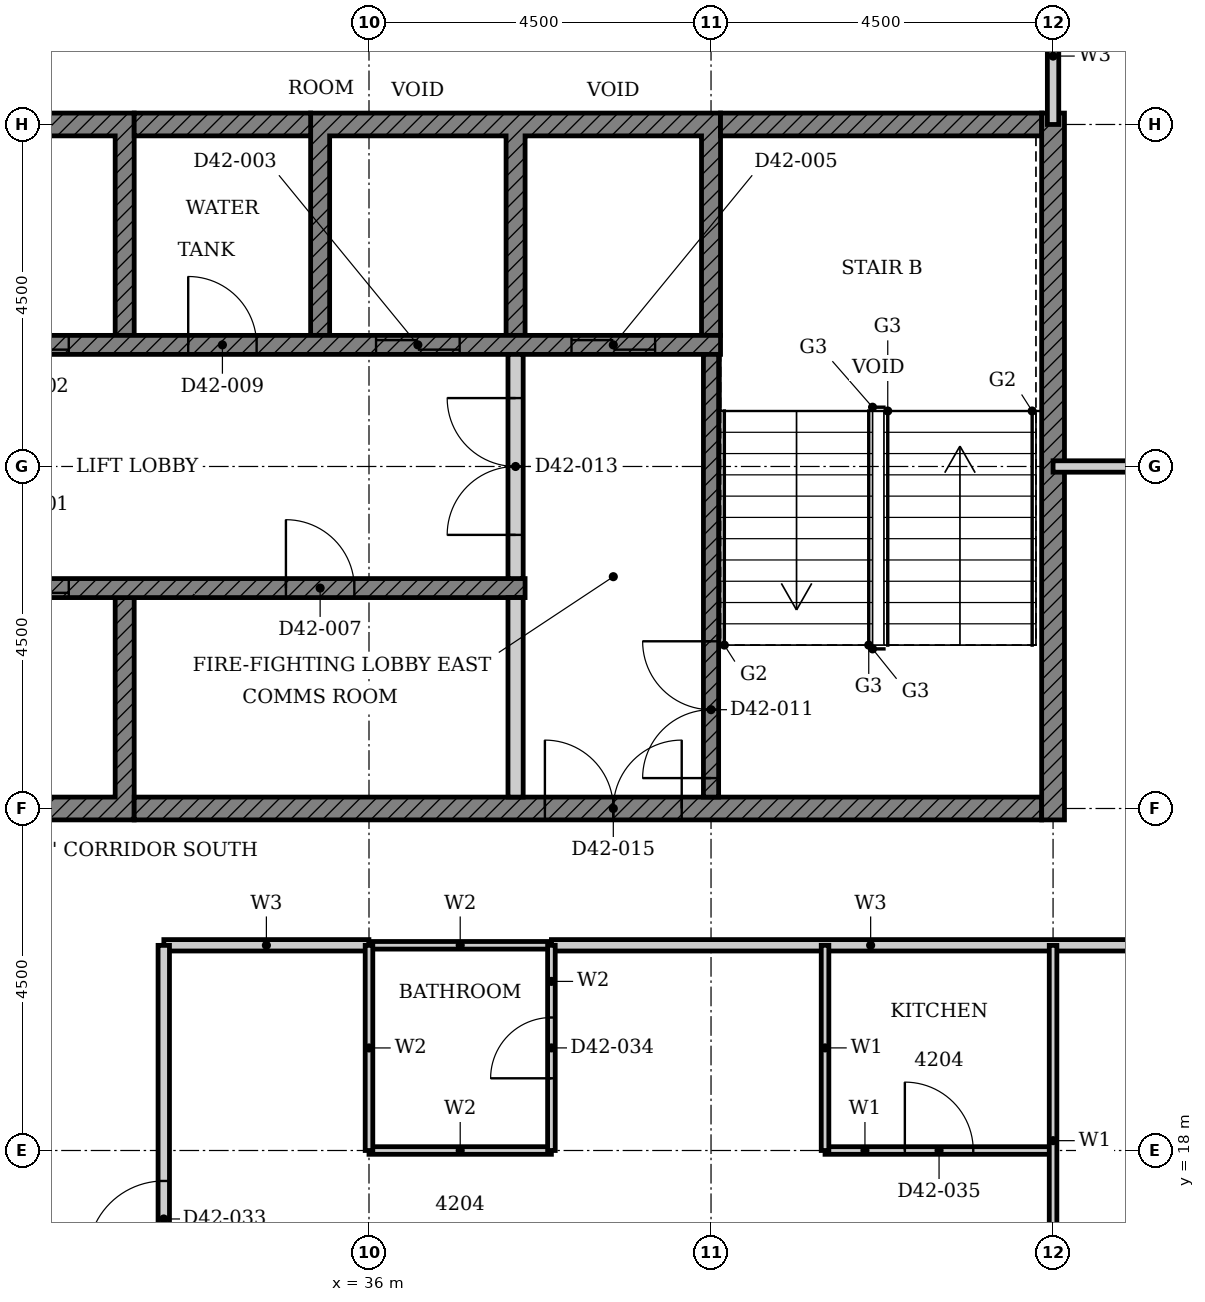
"""IFC4 building model, lengths in metres.
Left out: names, types, materials, properties, quantities, classifications, styles, units other than length and angle.
Written with IfcOpenShell. Run it as: python <this file> out.ifc"""

import sys

from ifc_helpers import new_model, si_unit, direction, frame, frame_2d, origin, place, context, subcontext, project, spatial, polyline, rectangle, outline, extrude, element, fill, save


model = new_model("IFC4")
c1 = context("Model", 3, precision=1e-05, world=origin(), true_north=direction((0.0, 1.0)))
c2 = subcontext(c1, "Body", "Model", "MODEL_VIEW")
j1 = project(units=[si_unit("LENGTHUNIT", "METRE"), si_unit("PLANEANGLEUNIT", "RADIAN")], contexts=[c1])
p1 = place(None, origin())
s1 = spatial("IfcSite", under=j1, at=p1, CompositionType="ELEMENT")
p2 = place(p1, origin())
s2 = spatial("IfcBuilding", under=s1, at=p2, CompositionType="ELEMENT")
p3 = place(p2, frame((0.0, 0.0, 169.1)))
s3 = spatial("IfcBuildingStorey", under=s2, at=p3, CompositionType="ELEMENT", Elevation=169.1)
p4 = place(p3, origin())
e1 = element("IfcWall", 1, at=p4, inside=s3, PredefinedType="SHEAR", context=c2, shape_type="SweptSolid", body=[
    extrude(outline(polyline([(27.518, 22.35), (32.911, 22.35), (32.911, 25.275), (32.661, 25.275), (32.661, 22.65), (30.339, 22.65), (30.339, 25.275), (30.089, 25.275), (30.089, 22.65), (27.768, 22.65), (27.768, 25.275), (27.518, 25.275), (27.518, 22.35)])), origin(), (0.0, 0.0, 1.0), 3.4),
])
p5 = place(p3, origin())
e2 = element("IfcWall", 2, at=p5, inside=s3, PredefinedType="SHEAR", context=c2, shape_type="SweptSolid", body=[
    extrude(outline(polyline([(27.518, 28.725), (27.768, 28.725), (27.768, 31.35), (30.089, 31.35), (30.089, 28.725), (30.339, 28.725), (30.339, 31.35), (32.661, 31.35), (32.661, 28.725), (32.911, 28.725), (32.911, 31.65), (27.518, 31.65), (27.518, 28.725)])), origin(), (0.0, 0.0, 1.0), 3.4),
])
p6 = place(p3, origin())
e3 = element("IfcWall", 3, at=p6, inside=s3, PredefinedType="SHEAR", context=c2, shape_type="SweptSolid", body=[
    extrude(outline(polyline([(35.232, 28.725), (35.482, 28.725), (35.482, 31.35), (37.803, 31.35), (37.803, 28.725), (38.053, 28.725), (38.053, 31.35), (40.375, 31.35), (40.375, 28.725), (40.625, 28.725), (40.625, 31.65), (35.232, 31.65), (35.232, 28.725)])), origin(), (0.0, 0.0, 1.0), 3.4),
])
p7 = place(p3, frame((32.911, 22.5, 0.0), z_axis=(0.0, 0.0, 1.0), x_axis=(1.0, 0.0, 0.0)))
e4 = element("IfcWall", 4, at=p7, inside=s3, PredefinedType="SHEAR", context=c2, shape_type="SweptSolid", body=[
    extrude(rectangle(XDim=11.939, YDim=0.3, at=frame_2d((5.97, 0.0))), origin(), (0.0, 0.0, 1.0), 3.4),
])
p8 = place(p7, frame((5.404, 0.0, 0.0)))
e5 = element("IfcOpeningElement", 5, at=p8, cuts=e4, PredefinedType="OPENING", context=c2, shape_type="SweptSolid", body=[
    extrude(rectangle(XDim=1.8, YDim=2.1, at=frame_2d((0.9, 1.05))), frame((0.0, 0.16, 0.0), z_axis=(0.0, -1.0, 0.0), x_axis=(1.0, 0.0, 0.0)), (0.0, 0.0, 1.0), 0.32),
])
p9 = place(p3, frame((32.911, 31.5, 0.0), z_axis=(0.0, 0.0, 1.0), x_axis=(1.0, 0.0, 0.0)))
e6 = element("IfcWall", 6, at=p9, inside=s3, PredefinedType="SHEAR", context=c2, shape_type="SweptSolid", body=[
    extrude(rectangle(XDim=2.322, YDim=0.3, at=frame_2d((1.161, 0.0))), origin(), (0.0, 0.0, 1.0), 3.4),
])
p10 = place(p3, frame((40.625, 31.5, 0.0), z_axis=(0.0, 0.0, 1.0), x_axis=(1.0, 0.0, 0.0)))
e7 = element("IfcWall", 7, at=p10, inside=s3, PredefinedType="SHEAR", context=c2, shape_type="SweptSolid", body=[
    extrude(rectangle(XDim=4.225, YDim=0.3, at=frame_2d((2.113, 0.0))), origin(), (0.0, 0.0, 1.0), 3.4),
])
p11 = place(p3, frame((45.0, 22.35, 0.0), z_axis=(0.0, 0.0, 1.0), x_axis=(0.0, 1.0, 0.0)))
e8 = element("IfcWall", 8, at=p11, inside=s3, PredefinedType="SHEAR", context=c2, shape_type="SweptSolid", body=[
    extrude(rectangle(XDim=9.3, YDim=0.3, at=frame_2d((4.65, 0.0))), origin(), (0.0, 0.0, 1.0), 3.4),
])
p12 = place(p3, frame((22.375, 25.4, 0.0), z_axis=(0.0, 0.0, 1.0), x_axis=(1.0, 0.0, 0.0)))
e9 = element("IfcWall", 9, at=p12, inside=s3, PredefinedType="SHEAR", context=c2, shape_type="SweptSolid", body=[
    extrude(rectangle(XDim=15.678, YDim=0.25, at=frame_2d((7.839, 0.0))), origin(), (0.0, 0.0, 1.0), 3.4),
])
p13 = place(p12, frame((8.575, 0.0, 0.0)))
e10 = element("IfcOpeningElement", 10, at=p13, cuts=e9, PredefinedType="OPENING", context=c2, shape_type="SweptSolid", body=[
    extrude(rectangle(XDim=1.1, YDim=2.1, at=frame_2d((0.55, 1.05))), frame((0.0, 0.135, 0.0), z_axis=(0.0, -1.0, 0.0), x_axis=(1.0, 0.0, 0.0)), (0.0, 0.0, 1.0), 0.27),
])
p14 = place(p12, frame((0.861, 0.0, 0.0)))
e11 = element("IfcOpeningElement", 11, at=p14, cuts=e9, PredefinedType="OPENING", context=c2, shape_type="SweptSolid", body=[
    extrude(rectangle(XDim=1.1, YDim=2.1, at=frame_2d((0.55, 1.05))), frame((0.0, 0.135, 0.0), z_axis=(0.0, -1.0, 0.0), x_axis=(1.0, 0.0, 0.0)), (0.0, 0.0, 1.0), 0.27),
])
p15 = place(p12, frame((3.532, 0.0, 0.0)))
e12 = element("IfcOpeningElement", 12, at=p15, cuts=e9, PredefinedType="OPENING", context=c2, shape_type="SweptSolid", body=[
    extrude(rectangle(XDim=0.9, YDim=2.1, at=frame_2d((0.45, 1.05))), frame((0.0, 0.135, 0.0), z_axis=(0.0, -1.0, 0.0), x_axis=(1.0, 0.0, 0.0)), (0.0, 0.0, 1.0), 0.27),
])
p16 = place(p12, frame((12.532, 0.0, 0.0)))
e13 = element("IfcOpeningElement", 13, at=p16, cuts=e9, PredefinedType="OPENING", context=c2, shape_type="SweptSolid", body=[
    extrude(rectangle(XDim=0.9, YDim=2.1, at=frame_2d((0.45, 1.05))), frame((0.0, 0.135, 0.0), z_axis=(0.0, -1.0, 0.0), x_axis=(1.0, 0.0, 0.0)), (0.0, 0.0, 1.0), 0.27),
])
p17 = place(p3, frame((24.947, 28.6, 0.0), z_axis=(0.0, 0.0, 1.0), x_axis=(1.0, 0.0, 0.0)))
e14 = element("IfcWall", 14, at=p17, inside=s3, PredefinedType="SHEAR", context=c2, shape_type="SweptSolid", body=[
    extrude(rectangle(XDim=15.678, YDim=0.25, at=frame_2d((7.839, 0.0))), origin(), (0.0, 0.0, 1.0), 3.4),
])
p18 = place(p17, frame((6.004, 0.0, 0.0)))
e15 = element("IfcOpeningElement", 15, at=p18, cuts=e14, PredefinedType="OPENING", context=c2, shape_type="SweptSolid", body=[
    extrude(rectangle(XDim=1.1, YDim=2.1, at=frame_2d((0.55, 1.05))), frame((0.0, 0.135, 0.0), z_axis=(0.0, -1.0, 0.0), x_axis=(1.0, 0.0, 0.0)), (0.0, 0.0, 1.0), 0.27),
])
p19 = place(p17, frame((11.146, 0.0, 0.0)))
e16 = element("IfcOpeningElement", 16, at=p19, cuts=e14, PredefinedType="OPENING", context=c2, shape_type="SweptSolid", body=[
    extrude(rectangle(XDim=1.1, YDim=2.1, at=frame_2d((0.55, 1.05))), frame((0.0, 0.135, 0.0), z_axis=(0.0, -1.0, 0.0), x_axis=(1.0, 0.0, 0.0)), (0.0, 0.0, 1.0), 0.27),
])
p20 = place(p17, frame((13.718, 0.0, 0.0)))
e17 = element("IfcOpeningElement", 17, at=p20, cuts=e14, PredefinedType="OPENING", context=c2, shape_type="SweptSolid", body=[
    extrude(rectangle(XDim=1.1, YDim=2.1, at=frame_2d((0.55, 1.05))), frame((0.0, 0.135, 0.0), z_axis=(0.0, -1.0, 0.0), x_axis=(1.0, 0.0, 0.0)), (0.0, 0.0, 1.0), 0.27),
])
p21 = place(p17, frame((0.961, 0.0, 0.0)))
e18 = element("IfcOpeningElement", 18, at=p21, cuts=e14, PredefinedType="OPENING", context=c2, shape_type="SweptSolid", body=[
    extrude(rectangle(XDim=0.9, YDim=2.1, at=frame_2d((0.45, 1.05))), frame((0.0, 0.135, 0.0), z_axis=(0.0, -1.0, 0.0), x_axis=(1.0, 0.0, 0.0)), (0.0, 0.0, 1.0), 0.27),
])
p22 = place(p17, frame((8.675, 0.0, 0.0)))
e19 = element("IfcOpeningElement", 19, at=p22, cuts=e14, PredefinedType="OPENING", context=c2, shape_type="SweptSolid", body=[
    extrude(rectangle(XDim=0.9, YDim=2.1, at=frame_2d((0.45, 1.05))), frame((0.0, 0.135, 0.0), z_axis=(0.0, -1.0, 0.0), x_axis=(1.0, 0.0, 0.0)), (0.0, 0.0, 1.0), 0.27),
])
p23 = place(p3, frame((37.928, 22.65, 0.0), z_axis=(0.0, 0.0, 1.0), x_axis=(0.0, 1.0, 0.0)))
e20 = element("IfcWall", 20, at=p23, inside=s3, PredefinedType="PARTITIONING", context=c2, shape_type="SweptSolid", body=[
    extrude(rectangle(XDim=2.625, YDim=0.2, at=frame_2d((1.312, 0.0))), origin(), (0.0, 0.0, 1.0), 3.4),
])
p24 = place(p3, frame((40.5, 22.65, 0.0), z_axis=(0.0, 0.0, 1.0), x_axis=(0.0, 1.0, 0.0)))
e21 = element("IfcWall", 21, at=p24, inside=s3, PredefinedType="SHEAR", context=c2, shape_type="SweptSolid", body=[
    extrude(rectangle(XDim=5.825, YDim=0.2, at=frame_2d((2.913, 0.0))), origin(), (0.0, 0.0, 1.0), 3.4),
])
p25 = place(p24, frame((0.25, 0.0, 0.0)))
e22 = element("IfcOpeningElement", 22, at=p25, cuts=e21, PredefinedType="OPENING", context=c2, shape_type="SweptSolid", body=[
    extrude(rectangle(XDim=1.8, YDim=2.1, at=frame_2d((0.9, 1.05))), frame((0.0, 0.11, 0.0), z_axis=(0.0, -1.0, 0.0), x_axis=(1.0, 0.0, 0.0)), (0.0, 0.0, 1.0), 0.22),
])
p26 = place(p3, frame((37.928, 25.525, 0.0), z_axis=(0.0, 0.0, 1.0), x_axis=(0.0, 1.0, 0.0)))
e23 = element("IfcWall", 23, at=p26, inside=s3, PredefinedType="PARTITIONING", context=c2, shape_type="SweptSolid", body=[
    extrude(rectangle(XDim=2.95, YDim=0.2, at=frame_2d((1.475, 0.0))), origin(), (0.0, 0.0, 1.0), 3.4),
])
p27 = place(p26, frame((0.575, 0.0, 0.0)))
e24 = element("IfcOpeningElement", 24, at=p27, cuts=e23, PredefinedType="OPENING", context=c2, shape_type="SweptSolid", body=[
    extrude(rectangle(XDim=1.8, YDim=2.1, at=frame_2d((0.9, 1.05))), frame((0.0, 0.11, 0.0), z_axis=(0.0, -1.0, 0.0), x_axis=(1.0, 0.0, 0.0)), (0.0, 0.0, 1.0), 0.22),
])
p28 = place(p3, frame((33.301, 20.7, 0.0), z_axis=(0.0, 0.0, 1.0), x_axis=(1.0, 0.0, 0.0)))
e25 = element("IfcWall", 25, at=p28, inside=s3, PredefinedType="PARTITIONING", context=c2, shape_type="SweptSolid", body=[
    extrude(rectangle(XDim=2.698, YDim=0.15, at=frame_2d((1.349, 0.0))), origin(), (0.0, 0.0, 1.0), 3.4),
])
p29 = place(p3, frame((38.4, 20.7, 0.0), z_axis=(0.0, 0.0, 1.0), x_axis=(1.0, 0.0, 0.0)))
e26 = element("IfcWall", 26, at=p29, inside=s3, PredefinedType="PARTITIONING", context=c2, shape_type="SweptSolid", body=[
    extrude(rectangle(XDim=8.4, YDim=0.15, at=frame_2d((4.2, 0.0))), origin(), (0.0, 0.0, 1.0), 3.4),
])
p30 = place(p3, frame((45.0, 27.0, 0.0), z_axis=(0.0, 0.0, 1.0), x_axis=(1.0, 0.0, 0.0)))
e27 = element("IfcWall", 27, at=p30, inside=s3, PredefinedType="PARTITIONING", context=c2, shape_type="SweptSolid", body=[
    extrude(rectangle(XDim=13.5, YDim=0.15, at=frame_2d((6.75, 0.0))), origin(), (0.0, 0.0, 1.0), 2.68),
])
p31 = place(p30, frame((7.15, 0.0, 0.0)))
e28 = element("IfcOpeningElement", 28, at=p31, cuts=e27, PredefinedType="OPENING", context=c2, shape_type="SweptSolid", body=[
    extrude(rectangle(XDim=1.0, YDim=2.1, at=frame_2d((0.5, 1.05))), frame((0.0, 0.085, 0.0), z_axis=(0.0, -1.0, 0.0), x_axis=(1.0, 0.0, 0.0)), (0.0, 0.0, 1.0), 0.17),
])
p32 = place(p3, frame((33.3, 4.5, 0.0), z_axis=(0.0, 0.0, 1.0), x_axis=(0.0, 1.0, 0.0)))
e29 = element("IfcWall", 29, at=p32, inside=s3, PredefinedType="PARTITIONING", context=c2, shape_type="SweptSolid", body=[
    extrude(rectangle(XDim=16.199, YDim=0.15, at=frame_2d((8.1, 0.0))), origin(), (0.0, 0.0, 1.0), 3.4),
])
p33 = place(p32, frame((12.099, 0.0, 0.0)))
e30 = element("IfcOpeningElement", 30, at=p33, cuts=e29, PredefinedType="OPENING", context=c2, shape_type="SweptSolid", body=[
    extrude(rectangle(XDim=1.0, YDim=2.2, at=frame_2d((0.5, 1.1))), frame((0.0, 0.085, 0.0), z_axis=(0.0, -1.0, 0.0), x_axis=(1.0, 0.0, 0.0)), (0.0, 0.0, 1.0), 0.17),
])
p34 = place(p32, frame((4.0, 0.0, 0.0)))
e31 = element("IfcOpeningElement", 31, at=p34, cuts=e29, PredefinedType="OPENING", context=c2, shape_type="SweptSolid", body=[
    extrude(rectangle(XDim=1.0, YDim=2.1, at=frame_2d((0.5, 1.05))), frame((0.0, 0.085, 0.0), z_axis=(0.0, -1.0, 0.0), x_axis=(1.0, 0.0, 0.0)), (0.0, 0.0, 1.0), 0.17),
])
p35 = place(p3, frame((45.0, 31.5, 0.0), z_axis=(0.0, 0.0, 1.0), x_axis=(0.0, 1.0, 0.0)))
e32 = element("IfcWall", 32, at=p35, inside=s3, PredefinedType="PARTITIONING", context=c2, shape_type="SweptSolid", body=[
    extrude(rectangle(XDim=1.8, YDim=0.15, at=frame_2d((0.9, 0.0))), origin(), (0.0, 0.0, 1.0), 3.4),
])
p36 = place(p3, frame((42.0, 18.0, 0.0), z_axis=(0.0, 0.0, 1.0), x_axis=(1.0, 0.0, 0.0)))
e33 = element("IfcWall", 33, at=p36, inside=s3, PredefinedType="PARTITIONING", context=c2, shape_type="SweptSolid", body=[
    extrude(rectangle(XDim=3.0, YDim=0.1, at=frame_2d((1.5, 0.0))), origin(), (0.0, 0.0, 1.0), 3.4),
])
p37 = place(p36, frame((1.05, 0.0, 0.0)))
e34 = element("IfcOpeningElement", 34, at=p37, cuts=e33, PredefinedType="OPENING", context=c2, shape_type="SweptSolid", body=[
    extrude(rectangle(XDim=0.9, YDim=2.1, at=frame_2d((0.45, 1.05))), frame((0.0, 0.06, 0.0), z_axis=(0.0, -1.0, 0.0), x_axis=(1.0, 0.0, 0.0)), (0.0, 0.0, 1.0), 0.12),
])
p38 = place(p3, frame((42.0, 18.0, 0.0), z_axis=(0.0, 0.0, 1.0), x_axis=(0.0, 1.0, 0.0)))
e35 = element("IfcWall", 35, at=p38, inside=s3, PredefinedType="PARTITIONING", context=c2, shape_type="SweptSolid", body=[
    extrude(rectangle(XDim=2.7, YDim=0.1, at=frame_2d((1.35, 0.0))), origin(), (0.0, 0.0, 1.0), 3.4),
])
p39 = place(p3, frame((45.0, 15.56, 0.0), z_axis=(0.0, 0.0, 1.0), x_axis=(0.0, 1.0, 0.0)))
e36 = element("IfcWall", 36, at=p39, inside=s3, PredefinedType="PARTITIONING", context=c2, shape_type="SweptSolid", body=[
    extrude(rectangle(XDim=5.139, YDim=0.1, at=frame_2d((2.569, 0.0))), origin(), (0.0, 0.0, 1.0), 3.4),
])
for number, where, z_axis, x_axis in (
    (37, (36.0, 18.0, 0.0), (0.0, 0.0, 1.0), (1.0, 0.0, 0.0)),
    (38, (36.0, 20.7, 0.0), (0.0, 0.0, 1.0), (1.0, 0.0, 0.0)),
):
    element("IfcWall", number, at=place(p3, frame(where, z_axis=z_axis, x_axis=x_axis)), inside=s3, PredefinedType="PARTITIONING", context=c2, shape_type="SweptSolid", body=[
        extrude(rectangle(XDim=2.4, YDim=0.1, at=frame_2d((1.2, 0.0))), origin(), (0.0, 0.0, 1.0), 3.4),
    ])
p40 = place(p3, frame((36.0, 18.0, 0.0), z_axis=(0.0, 0.0, 1.0), x_axis=(0.0, 1.0, 0.0)))
e39 = element("IfcWall", 39, at=p40, inside=s3, PredefinedType="PARTITIONING", context=c2, shape_type="SweptSolid", body=[
    extrude(rectangle(XDim=2.699, YDim=0.1, at=frame_2d((1.35, 0.0))), origin(), (0.0, 0.0, 1.0), 3.4),
])
p41 = place(p3, frame((38.4, 18.0, 0.0), z_axis=(0.0, 0.0, 1.0), x_axis=(0.0, 1.0, 0.0)))
e40 = element("IfcWall", 40, at=p41, inside=s3, PredefinedType="PARTITIONING", context=c2, shape_type="SweptSolid", body=[
    extrude(rectangle(XDim=2.7, YDim=0.1, at=frame_2d((1.35, 0.0))), origin(), (0.0, 0.0, 1.0), 3.4),
])
p42 = place(p41, frame((0.95, 0.0, 0.0)))
e41 = element("IfcOpeningElement", 41, at=p42, cuts=e40, PredefinedType="OPENING", context=c2, shape_type="SweptSolid", body=[
    extrude(rectangle(XDim=0.8, YDim=2.1, at=frame_2d((0.4, 1.05))), frame((0.0, 0.06, 0.0), z_axis=(0.0, -1.0, 0.0), x_axis=(1.0, 0.0, 0.0)), (0.0, 0.0, 1.0), 0.12),
])
p43 = place(p13, origin())
e42 = element("IfcDoor", 42, at=p43, inside=s3, OperationType="DOUBLE_DOOR_SLIDING", PredefinedType="DOOR", context=c2, shape_type="SweptSolid", body=[
    extrude(rectangle(XDim=1.1, YDim=2.1, at=frame_2d((0.55, 1.05))), frame((0.0, 0.025, 0.0), z_axis=(0.0, -1.0, 0.0), x_axis=(1.0, 0.0, 0.0)), (0.0, 0.0, 1.0), 0.05),
])
fill(e10, e42)
p44 = place(p18, origin())
e43 = element("IfcDoor", 43, at=p44, inside=s3, OperationType="DOUBLE_DOOR_SLIDING", PredefinedType="DOOR", context=c2, shape_type="SweptSolid", body=[
    extrude(rectangle(XDim=1.1, YDim=2.1, at=frame_2d((0.55, 1.05))), frame((0.0, 0.025, 0.0), z_axis=(0.0, -1.0, 0.0), x_axis=(1.0, 0.0, 0.0)), (0.0, 0.0, 1.0), 0.05),
])
fill(e15, e43)
p45 = place(p19, origin())
e44 = element("IfcDoor", 44, at=p45, inside=s3, OperationType="DOUBLE_DOOR_SLIDING", PredefinedType="DOOR", context=c2, shape_type="SweptSolid", body=[
    extrude(rectangle(XDim=1.1, YDim=2.1, at=frame_2d((0.55, 1.05))), frame((0.0, 0.025, 0.0), z_axis=(0.0, -1.0, 0.0), x_axis=(1.0, 0.0, 0.0)), (0.0, 0.0, 1.0), 0.05),
])
fill(e16, e44)
p46 = place(p20, origin())
e45 = element("IfcDoor", 45, at=p46, inside=s3, OperationType="DOUBLE_DOOR_SLIDING", PredefinedType="DOOR", context=c2, shape_type="SweptSolid", body=[
    extrude(rectangle(XDim=1.1, YDim=2.1, at=frame_2d((0.55, 1.05))), frame((0.0, 0.025, 0.0), z_axis=(0.0, -1.0, 0.0), x_axis=(1.0, 0.0, 0.0)), (0.0, 0.0, 1.0), 0.05),
])
fill(e17, e45)
p47 = place(p16, origin())
e46 = element("IfcDoor", 46, at=p47, inside=s3, OperationType="SINGLE_SWING_LEFT", PredefinedType="DOOR", context=c2, shape_type="SweptSolid", body=[
    extrude(rectangle(XDim=0.9, YDim=2.1, at=frame_2d((0.45, 1.05))), frame((0.0, 0.025, 0.0), z_axis=(0.0, -1.0, 0.0), x_axis=(1.0, 0.0, 0.0)), (0.0, 0.0, 1.0), 0.05),
])
fill(e13, e46)
p48 = place(p22, origin())
e47 = element("IfcDoor", 47, at=p48, inside=s3, OperationType="SINGLE_SWING_LEFT", PredefinedType="DOOR", context=c2, shape_type="SweptSolid", body=[
    extrude(rectangle(XDim=0.9, YDim=2.1, at=frame_2d((0.45, 1.05))), frame((0.0, 0.025, 0.0), z_axis=(0.0, -1.0, 0.0), x_axis=(1.0, 0.0, 0.0)), (0.0, 0.0, 1.0), 0.05),
])
fill(e19, e47)
p49 = place(p25, origin())
e48 = element("IfcDoor", 48, at=p49, inside=s3, OperationType="DOUBLE_DOOR_SINGLE_SWING", PredefinedType="DOOR", context=c2, shape_type="SweptSolid", body=[
    extrude(rectangle(XDim=1.8, YDim=2.1, at=frame_2d((0.9, 1.05))), frame((0.0, 0.025, 0.0), z_axis=(0.0, -1.0, 0.0), x_axis=(1.0, 0.0, 0.0)), (0.0, 0.0, 1.0), 0.05),
])
fill(e22, e48)
p50 = place(p27, origin())
e49 = element("IfcDoor", 49, at=p50, inside=s3, OperationType="DOUBLE_DOOR_SINGLE_SWING", PredefinedType="DOOR", context=c2, shape_type="SweptSolid", body=[
    extrude(rectangle(XDim=1.8, YDim=2.1, at=frame_2d((0.9, 1.05))), frame((0.0, 0.025, 0.0), z_axis=(0.0, -1.0, 0.0), x_axis=(1.0, 0.0, 0.0)), (0.0, 0.0, 1.0), 0.05),
])
fill(e24, e49)
p51 = place(p8, origin())
e50 = element("IfcDoor", 50, at=p51, inside=s3, OperationType="DOUBLE_DOOR_SINGLE_SWING", PredefinedType="DOOR", context=c2, shape_type="SweptSolid", body=[
    extrude(rectangle(XDim=1.8, YDim=2.1, at=frame_2d((0.9, 1.05))), frame((0.0, 0.025, 0.0), z_axis=(0.0, -1.0, 0.0), x_axis=(1.0, 0.0, 0.0)), (0.0, 0.0, 1.0), 0.05),
])
fill(e5, e50)
p52 = place(p33, origin())
e51 = element("IfcDoor", 51, at=p52, inside=s3, OperationType="SINGLE_SWING_LEFT", PredefinedType="DOOR", context=c2, shape_type="SweptSolid", body=[
    extrude(rectangle(XDim=1.0, YDim=2.2, at=frame_2d((0.5, 1.1))), frame((0.0, 0.025, 0.0), z_axis=(0.0, -1.0, 0.0), x_axis=(1.0, 0.0, 0.0)), (0.0, 0.0, 1.0), 0.05),
])
fill(e30, e51)
p53 = place(p42, origin())
e52 = element("IfcDoor", 52, at=p53, inside=s3, OperationType="SINGLE_SWING_RIGHT", PredefinedType="DOOR", context=c2, shape_type="SweptSolid", body=[
    extrude(rectangle(XDim=0.8, YDim=2.1, at=frame_2d((0.4, 1.05))), frame((0.0, 0.025, 0.0), z_axis=(0.0, -1.0, 0.0), x_axis=(1.0, 0.0, 0.0)), (0.0, 0.0, 1.0), 0.05),
])
fill(e41, e52)
p54 = place(p37, origin())
e53 = element("IfcDoor", 53, at=p54, inside=s3, OperationType="SINGLE_SWING_RIGHT", PredefinedType="DOOR", context=c2, shape_type="SweptSolid", body=[
    extrude(rectangle(XDim=0.9, YDim=2.1, at=frame_2d((0.45, 1.05))), frame((0.0, 0.025, 0.0), z_axis=(0.0, -1.0, 0.0), x_axis=(1.0, 0.0, 0.0)), (0.0, 0.0, 1.0), 0.05),
])
fill(e34, e53)
save(model, sys.argv[1])
